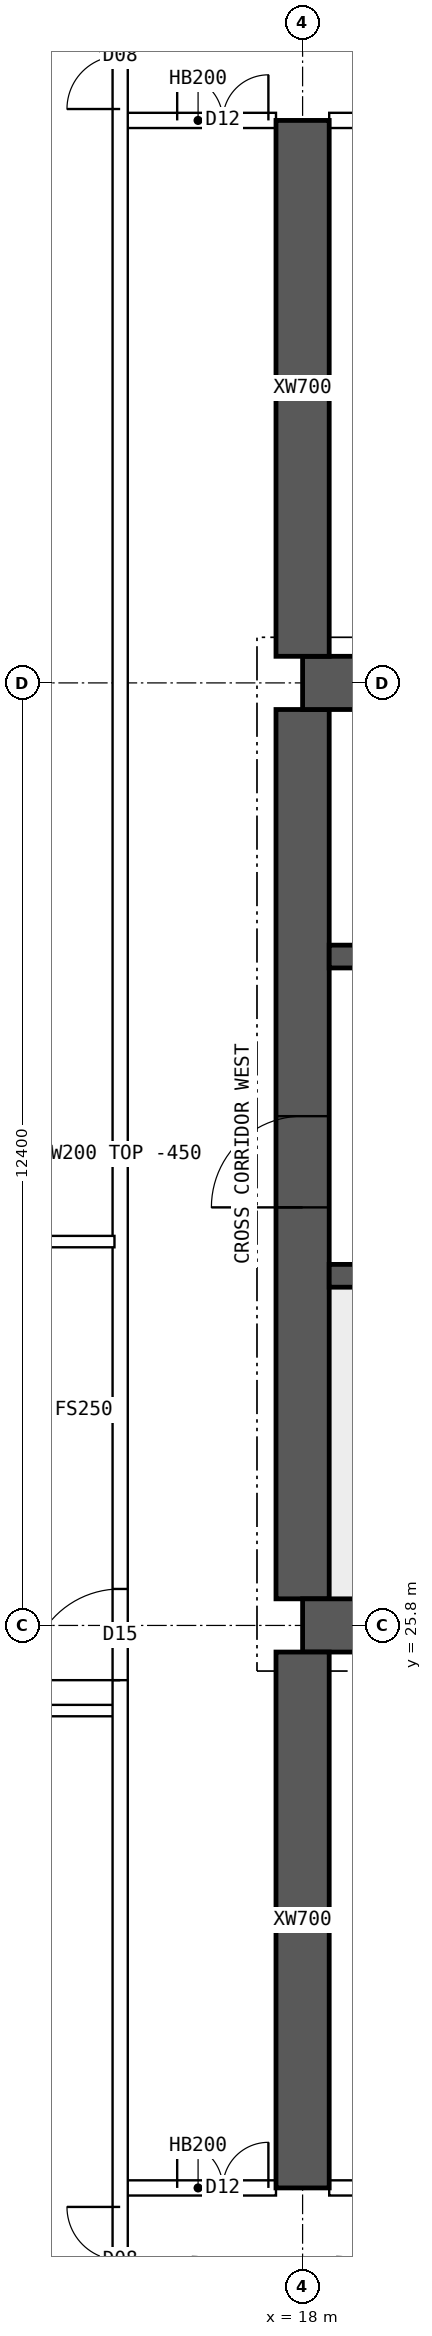
"""IFC4 building model, lengths in metres.
Left out: names, types, materials, properties, quantities, classifications, styles, units other than length and angle.
Written with IfcOpenShell. Run it as: python <this file> out.ifc"""

import sys

from ifc_helpers import new_model, si_unit, direction, frame, frame_2d, origin, place, context, subcontext, project, spatial, polyline, rectangle, outline, extrude, element, fill, save


model = new_model("IFC4")
c1 = context("Model", 3, precision=1e-05, world=origin(), true_north=direction((0.0, 1.0)))
c2 = subcontext(c1, "Body", "Model", "MODEL_VIEW")
j1 = project(units=[si_unit("LENGTHUNIT", "METRE"), si_unit("PLANEANGLEUNIT", "RADIAN")], contexts=[c1])
p1 = place(None, origin())
s1 = spatial("IfcSite", under=j1, at=p1, CompositionType="ELEMENT")
p2 = place(p1, origin())
s2 = spatial("IfcBuilding", under=s1, at=p2, CompositionType="ELEMENT")
p3 = place(p2, frame((0.0, 0.0, 212.8)))
s3 = spatial("IfcBuildingStorey", under=s2, at=p3, CompositionType="ELEMENT", Elevation=212.8)
for number, where, z_axis, x_axis in (
    (1, (18.0, 25.8, 0.0), (0.0, 0.0, 1.0), (1.0, 0.0, 0.0)),
    (2, (18.0, 38.2, 0.0), (0.0, 0.0, 1.0), (1.0, 0.0, 0.0)),
):
    element("IfcWall", number, at=place(p3, frame(where, z_axis=z_axis, x_axis=x_axis)), inside=s3, PredefinedType="SHEAR", context=c2, shape_type="SweptSolid", body=[
        extrude(rectangle(XDim=48.0, YDim=0.7, at=frame_2d((24.0, 0.0))), origin(), (0.0, 0.0, 1.0), 3.75),
    ])
p4 = place(p3, frame((18.0, 26.15, 0.0), z_axis=(0.0, 0.0, 1.0), x_axis=(0.0, 1.0, 0.0)))
e3 = element("IfcWall", 3, at=p4, inside=s3, PredefinedType="SHEAR", context=c2, shape_type="SweptSolid", body=[
    extrude(rectangle(XDim=11.7, YDim=0.7, at=frame_2d((5.85, 0.0))), origin(), (0.0, 0.0, 1.0), 3.75),
])
p5 = place(p4, frame((5.15, 0.0, 0.0)))
e4 = element("IfcOpeningElement", 4, at=p5, cuts=e3, PredefinedType="OPENING", context=c2, shape_type="SweptSolid", body=[
    extrude(rectangle(XDim=1.2, YDim=2.1, at=frame_2d((0.6, 1.05))), frame((0.0, 0.36, 0.0), z_axis=(0.0, -1.0, 0.0), x_axis=(1.0, 0.0, 0.0)), (0.0, 0.0, 1.0), 0.72),
])
p6 = place(p3, frame((18.35, 30.4, 0.0), z_axis=(0.0, 0.0, 1.0), x_axis=(1.0, 0.0, 0.0)))
e5 = element("IfcWall", 5, at=p6, inside=s3, PredefinedType="SHEAR", context=c2, shape_type="SweptSolid", body=[
    extrude(rectangle(XDim=47.3, YDim=0.3, at=frame_2d((23.65, 0.0))), origin(), (0.0, 0.0, 1.0), 3.75),
])
p7 = place(p6, frame((0.4, 0.0, 0.0)))
e6 = element("IfcOpeningElement", 6, at=p7, cuts=e5, PredefinedType="OPENING", context=c2, shape_type="SweptSolid", body=[
    extrude(rectangle(XDim=1.0, YDim=2.1, at=frame_2d((0.5, 1.05))), frame((0.0, 0.16, 0.0), z_axis=(0.0, -1.0, 0.0), x_axis=(1.0, 0.0, 0.0)), (0.0, 0.0, 1.0), 0.32),
])
p8 = place(p6, frame((45.9, 0.0, 0.0)))
e7 = element("IfcOpeningElement", 7, at=p8, cuts=e5, PredefinedType="OPENING", context=c2, shape_type="SweptSolid", body=[
    extrude(rectangle(XDim=1.0, YDim=2.1, at=frame_2d((0.5, 1.05))), frame((0.0, 0.16, 0.0), z_axis=(0.0, -1.0, 0.0), x_axis=(1.0, 0.0, 0.0)), (0.0, 0.0, 1.0), 0.32),
])
p9 = place(p6, frame((8.4, 0.0, 0.0)))
e8 = element("IfcOpeningElement", 8, at=p9, cuts=e5, PredefinedType="OPENING", context=c2, shape_type="SweptSolid", body=[
    extrude(rectangle(XDim=1.1, YDim=2.1, at=frame_2d((0.55, 1.05))), frame((0.0, 0.16, 0.0), z_axis=(0.0, -1.0, 0.0), x_axis=(1.0, 0.0, 0.0)), (0.0, 0.0, 1.0), 0.32),
])
p10 = place(p6, frame((11.0, 0.0, 0.0)))
e9 = element("IfcOpeningElement", 9, at=p10, cuts=e5, PredefinedType="OPENING", context=c2, shape_type="SweptSolid", body=[
    extrude(rectangle(XDim=1.1, YDim=2.1, at=frame_2d((0.55, 1.05))), frame((0.0, 0.16, 0.0), z_axis=(0.0, -1.0, 0.0), x_axis=(1.0, 0.0, 0.0)), (0.0, 0.0, 1.0), 0.32),
])
p11 = place(p6, frame((13.6, 0.0, 0.0)))
e10 = element("IfcOpeningElement", 10, at=p11, cuts=e5, PredefinedType="OPENING", context=c2, shape_type="SweptSolid", body=[
    extrude(rectangle(XDim=1.1, YDim=2.1, at=frame_2d((0.55, 1.05))), frame((0.0, 0.16, 0.0), z_axis=(0.0, -1.0, 0.0), x_axis=(1.0, 0.0, 0.0)), (0.0, 0.0, 1.0), 0.32),
])
p12 = place(p6, frame((16.2, 0.0, 0.0)))
e11 = element("IfcOpeningElement", 11, at=p12, cuts=e5, PredefinedType="OPENING", context=c2, shape_type="SweptSolid", body=[
    extrude(rectangle(XDim=1.1, YDim=2.1, at=frame_2d((0.55, 1.05))), frame((0.0, 0.16, 0.0), z_axis=(0.0, -1.0, 0.0), x_axis=(1.0, 0.0, 0.0)), (0.0, 0.0, 1.0), 0.32),
])
p13 = place(p6, frame((18.975, 0.0, 0.0)))
e12 = element("IfcOpeningElement", 12, at=p13, cuts=e5, PredefinedType="OPENING", context=c2, shape_type="SweptSolid", body=[
    extrude(rectangle(XDim=0.9, YDim=2.1, at=frame_2d((0.45, 1.05))), frame((0.0, 0.16, 0.0), z_axis=(0.0, -1.0, 0.0), x_axis=(1.0, 0.0, 0.0)), (0.0, 0.0, 1.0), 0.32),
])
p14 = place(p6, frame((30.267, 0.0, 0.0)))
e13 = element("IfcOpeningElement", 13, at=p14, cuts=e5, PredefinedType="OPENING", context=c2, shape_type="SweptSolid", body=[
    extrude(rectangle(XDim=1.1, YDim=2.1, at=frame_2d((0.55, 1.05))), frame((0.0, 0.16, 0.0), z_axis=(0.0, -1.0, 0.0), x_axis=(1.0, 0.0, 0.0)), (0.0, 0.0, 1.0), 0.32),
])
p15 = place(p6, frame((33.8, 0.0, 0.0)))
e14 = element("IfcOpeningElement", 14, at=p15, cuts=e5, PredefinedType="OPENING", context=c2, shape_type="SweptSolid", body=[
    extrude(rectangle(XDim=1.1, YDim=2.1, at=frame_2d((0.55, 1.05))), frame((0.0, 0.16, 0.0), z_axis=(0.0, -1.0, 0.0), x_axis=(1.0, 0.0, 0.0)), (0.0, 0.0, 1.0), 0.32),
])
p16 = place(p6, frame((37.333, 0.0, 0.0)))
e15 = element("IfcOpeningElement", 15, at=p16, cuts=e5, PredefinedType="OPENING", context=c2, shape_type="SweptSolid", body=[
    extrude(rectangle(XDim=1.1, YDim=2.1, at=frame_2d((0.55, 1.05))), frame((0.0, 0.16, 0.0), z_axis=(0.0, -1.0, 0.0), x_axis=(1.0, 0.0, 0.0)), (0.0, 0.0, 1.0), 0.32),
])
p17 = place(p3, frame((18.35, 34.6, 0.0), z_axis=(0.0, 0.0, 1.0), x_axis=(1.0, 0.0, 0.0)))
e16 = element("IfcWall", 16, at=p17, inside=s3, PredefinedType="SHEAR", context=c2, shape_type="SweptSolid", body=[
    extrude(rectangle(XDim=47.3, YDim=0.3, at=frame_2d((23.65, 0.0))), origin(), (0.0, 0.0, 1.0), 3.75),
])
p18 = place(p17, frame((0.9, 0.0, 0.0)))
e17 = element("IfcOpeningElement", 17, at=p18, cuts=e16, PredefinedType="OPENING", context=c2, shape_type="SweptSolid", body=[
    extrude(rectangle(XDim=1.1, YDim=2.1, at=frame_2d((0.55, 1.05))), frame((0.0, 0.16, 0.0), z_axis=(0.0, -1.0, 0.0), x_axis=(1.0, 0.0, 0.0)), (0.0, 0.0, 1.0), 0.32),
])
p19 = place(p17, frame((45.3, 0.0, 0.0)))
e18 = element("IfcOpeningElement", 18, at=p19, cuts=e16, PredefinedType="OPENING", context=c2, shape_type="SweptSolid", body=[
    extrude(rectangle(XDim=1.1, YDim=2.1, at=frame_2d((0.55, 1.05))), frame((0.0, 0.16, 0.0), z_axis=(0.0, -1.0, 0.0), x_axis=(1.0, 0.0, 0.0)), (0.0, 0.0, 1.0), 0.32),
])
p20 = place(p17, frame((4.25, 0.0, 0.0)))
e19 = element("IfcOpeningElement", 19, at=p20, cuts=e16, PredefinedType="OPENING", context=c2, shape_type="SweptSolid", body=[
    extrude(rectangle(XDim=0.9, YDim=2.1, at=frame_2d((0.45, 1.05))), frame((0.0, 0.16, 0.0), z_axis=(0.0, -1.0, 0.0), x_axis=(1.0, 0.0, 0.0)), (0.0, 0.0, 1.0), 0.32),
])
p21 = place(p17, frame((42.15, 0.0, 0.0)))
e20 = element("IfcOpeningElement", 20, at=p21, cuts=e16, PredefinedType="OPENING", context=c2, shape_type="SweptSolid", body=[
    extrude(rectangle(XDim=0.9, YDim=2.1, at=frame_2d((0.45, 1.05))), frame((0.0, 0.16, 0.0), z_axis=(0.0, -1.0, 0.0), x_axis=(1.0, 0.0, 0.0)), (0.0, 0.0, 1.0), 0.32),
])
p22 = place(p17, frame((9.025, 0.0, 0.0)))
e21 = element("IfcOpeningElement", 21, at=p22, cuts=e16, PredefinedType="OPENING", context=c2, shape_type="SweptSolid", body=[
    extrude(rectangle(XDim=0.9, YDim=2.1, at=frame_2d((0.45, 1.05))), frame((0.0, 0.16, 0.0), z_axis=(0.0, -1.0, 0.0), x_axis=(1.0, 0.0, 0.0)), (0.0, 0.0, 1.0), 0.32),
])
p23 = place(p17, frame((12.999, 0.0, 0.0)))
e22 = element("IfcOpeningElement", 22, at=p23, cuts=e16, PredefinedType="OPENING", context=c2, shape_type="SweptSolid", body=[
    extrude(rectangle(XDim=0.9, YDim=2.1, at=frame_2d((0.45, 1.05))), frame((0.0, 0.16, 0.0), z_axis=(0.0, -1.0, 0.0), x_axis=(1.0, 0.0, 0.0)), (0.0, 0.0, 1.0), 0.32),
])
p24 = place(p17, frame((16.646, 0.0, 0.0)))
e23 = element("IfcOpeningElement", 23, at=p24, cuts=e16, PredefinedType="OPENING", context=c2, shape_type="SweptSolid", body=[
    extrude(rectangle(XDim=0.9, YDim=2.1, at=frame_2d((0.45, 1.05))), frame((0.0, 0.16, 0.0), z_axis=(0.0, -1.0, 0.0), x_axis=(1.0, 0.0, 0.0)), (0.0, 0.0, 1.0), 0.32),
])
p25 = place(p17, frame((20.405, 0.0, 0.0)))
e24 = element("IfcOpeningElement", 24, at=p25, cuts=e16, PredefinedType="OPENING", context=c2, shape_type="SweptSolid", body=[
    extrude(rectangle(XDim=0.9, YDim=2.1, at=frame_2d((0.45, 1.05))), frame((0.0, 0.16, 0.0), z_axis=(0.0, -1.0, 0.0), x_axis=(1.0, 0.0, 0.0)), (0.0, 0.0, 1.0), 0.32),
])
p26 = place(p17, frame((24.811, 0.0, 0.0)))
e25 = element("IfcOpeningElement", 25, at=p26, cuts=e16, PredefinedType="OPENING", context=c2, shape_type="SweptSolid", body=[
    extrude(rectangle(XDim=0.9, YDim=2.1, at=frame_2d((0.45, 1.05))), frame((0.0, 0.16, 0.0), z_axis=(0.0, -1.0, 0.0), x_axis=(1.0, 0.0, 0.0)), (0.0, 0.0, 1.0), 0.32),
])
p27 = place(p17, frame((27.608, 0.0, 0.0)))
e26 = element("IfcOpeningElement", 26, at=p27, cuts=e16, PredefinedType="OPENING", context=c2, shape_type="SweptSolid", body=[
    extrude(rectangle(XDim=0.9, YDim=2.1, at=frame_2d((0.45, 1.05))), frame((0.0, 0.16, 0.0), z_axis=(0.0, -1.0, 0.0), x_axis=(1.0, 0.0, 0.0)), (0.0, 0.0, 1.0), 0.32),
])
p28 = place(p17, frame((29.981, 0.0, 0.0)))
e27 = element("IfcOpeningElement", 27, at=p28, cuts=e16, PredefinedType="OPENING", context=c2, shape_type="SweptSolid", body=[
    extrude(rectangle(XDim=0.9, YDim=2.1, at=frame_2d((0.45, 1.05))), frame((0.0, 0.16, 0.0), z_axis=(0.0, -1.0, 0.0), x_axis=(1.0, 0.0, 0.0)), (0.0, 0.0, 1.0), 0.32),
])
p29 = place(p17, frame((33.831, 0.0, 0.0)))
e28 = element("IfcOpeningElement", 28, at=p29, cuts=e16, PredefinedType="OPENING", context=c2, shape_type="SweptSolid", body=[
    extrude(rectangle(XDim=0.9, YDim=2.1, at=frame_2d((0.45, 1.05))), frame((0.0, 0.16, 0.0), z_axis=(0.0, -1.0, 0.0), x_axis=(1.0, 0.0, 0.0)), (0.0, 0.0, 1.0), 0.32),
])
p30 = place(p17, frame((37.579, 0.0, 0.0)))
e29 = element("IfcOpeningElement", 29, at=p30, cuts=e16, PredefinedType="OPENING", context=c2, shape_type="SweptSolid", body=[
    extrude(rectangle(XDim=0.9, YDim=2.1, at=frame_2d((0.45, 1.05))), frame((0.0, 0.16, 0.0), z_axis=(0.0, -1.0, 0.0), x_axis=(1.0, 0.0, 0.0)), (0.0, 0.0, 1.0), 0.32),
])
for number, where, z_axis, x_axis in (
    (30, (18.0, 18.4, 0.0), (0.0, 0.0, 1.0), (0.0, 1.0, 0.0)),
    (31, (18.0, 38.55, 0.0), (0.0, 0.0, 1.0), (0.0, 1.0, 0.0)),
):
    element("IfcWall", number, at=place(p3, frame(where, z_axis=z_axis, x_axis=x_axis)), inside=s3, PredefinedType="SHEAR", context=c2, shape_type="SweptSolid", body=[
        extrude(rectangle(XDim=7.05, YDim=0.7, at=frame_2d((3.525, 0.0))), origin(), (0.0, 0.0, 1.0), 3.75),
    ])
p31 = place(p3, frame((15.6, 18.4, 0.0), z_axis=(0.0, 0.0, 1.0), x_axis=(1.0, 0.0, 0.0)))
e32 = element("IfcWall", 32, at=p31, inside=s3, PredefinedType="SOLIDWALL", context=c2, shape_type="SweptSolid", body=[
    extrude(rectangle(XDim=2.05, YDim=0.2, at=frame_2d((1.025, 0.0))), origin(), (0.0, 0.0, 1.0), 3.3),
])
p32 = place(p31, frame((0.75, 0.0, 0.0)))
e33 = element("IfcOpeningElement", 33, at=p32, cuts=e32, PredefinedType="OPENING", context=c2, shape_type="SweptSolid", body=[
    extrude(rectangle(XDim=1.2, YDim=2.1, at=frame_2d((0.6, 1.05))), frame((0.0, 0.11, 0.0), z_axis=(0.0, -1.0, 0.0), x_axis=(1.0, 0.0, 0.0)), (0.0, 0.0, 1.0), 0.22),
])
p33 = place(p3, frame((18.35, 18.4, 0.0), z_axis=(0.0, 0.0, 1.0), x_axis=(1.0, 0.0, 0.0)))
e34 = element("IfcWall", 34, at=p33, inside=s3, PredefinedType="SOLIDWALL", context=c2, shape_type="SweptSolid", body=[
    extrude(rectangle(XDim=5.3, YDim=0.2, at=frame_2d((2.65, 0.0))), origin(), (0.0, 0.0, 1.0), 3.3),
])
p34 = place(p33, frame((0.35, 0.0, 0.0)))
e35 = element("IfcOpeningElement", 35, at=p34, cuts=e34, PredefinedType="OPENING", context=c2, shape_type="SweptSolid", body=[
    extrude(rectangle(XDim=0.9, YDim=2.1, at=frame_2d((0.45, 1.05))), frame((0.0, 0.11, 0.0), z_axis=(0.0, -1.0, 0.0), x_axis=(1.0, 0.0, 0.0)), (0.0, 0.0, 1.0), 0.22),
])
p35 = place(p33, frame((3.165, 0.0, 0.0)))
e36 = element("IfcOpeningElement", 36, at=p35, cuts=e34, PredefinedType="OPENING", context=c2, shape_type="SweptSolid", body=[
    extrude(rectangle(XDim=0.9, YDim=2.1, at=frame_2d((0.45, 1.05))), frame((0.0, 0.11, 0.0), z_axis=(0.0, -1.0, 0.0), x_axis=(1.0, 0.0, 0.0)), (0.0, 0.0, 1.0), 0.22),
])
p36 = place(p3, frame((15.6, 45.6, 0.0), z_axis=(0.0, 0.0, 1.0), x_axis=(1.0, 0.0, 0.0)))
e37 = element("IfcWall", 37, at=p36, inside=s3, PredefinedType="SOLIDWALL", context=c2, shape_type="SweptSolid", body=[
    extrude(rectangle(XDim=2.05, YDim=0.2, at=frame_2d((1.025, 0.0))), origin(), (0.0, 0.0, 1.0), 3.3),
])
p37 = place(p36, frame((0.75, 0.0, 0.0)))
e38 = element("IfcOpeningElement", 38, at=p37, cuts=e37, PredefinedType="OPENING", context=c2, shape_type="SweptSolid", body=[
    extrude(rectangle(XDim=1.2, YDim=2.1, at=frame_2d((0.6, 1.05))), frame((0.0, 0.11, 0.0), z_axis=(0.0, -1.0, 0.0), x_axis=(1.0, 0.0, 0.0)), (0.0, 0.0, 1.0), 0.22),
])
p38 = place(p3, frame((18.35, 45.6, 0.0), z_axis=(0.0, 0.0, 1.0), x_axis=(1.0, 0.0, 0.0)))
e39 = element("IfcWall", 39, at=p38, inside=s3, PredefinedType="SOLIDWALL", context=c2, shape_type="SweptSolid", body=[
    extrude(rectangle(XDim=5.3, YDim=0.2, at=frame_2d((2.65, 0.0))), origin(), (0.0, 0.0, 1.0), 3.3),
])
p39 = place(p38, frame((0.8, 0.0, 0.0)))
e40 = element("IfcOpeningElement", 40, at=p39, cuts=e39, PredefinedType="OPENING", context=c2, shape_type="SweptSolid", body=[
    extrude(rectangle(XDim=1.0, YDim=2.1, at=frame_2d((0.5, 1.05))), frame((0.0, 0.11, 0.0), z_axis=(0.0, -1.0, 0.0), x_axis=(1.0, 0.0, 0.0)), (0.0, 0.0, 1.0), 0.22),
])
p40 = place(p3, frame((8.705, 30.85, 0.0), z_axis=(0.0, 0.0, 1.0), x_axis=(1.0, 0.0, 0.0)))
e41 = element("IfcWall", 41, at=p40, inside=s3, PredefinedType="PARTITIONING", context=c2, shape_type="SweptSolid", body=[
    extrude(outline(polyline([(0.0, 0.0), (6.82, 0.0), (6.82, 3.3), (3.597, 3.3), (3.595, 2.85), (2.997, 2.85), (2.995, 3.3), (0.0, 3.3), (0.0, 0.0)])), frame((0.0, 0.075, 0.0), z_axis=(0.0, -1.0, 0.0), x_axis=(1.0, 0.0, 0.0)), (0.0, 0.0, 1.0), 0.15),
])
p41 = place(p3, frame((15.6, 11.646, 0.0), z_axis=(0.0, 0.0, 1.0), x_axis=(0.0, 1.0, 0.0)))
e42 = element("IfcWall", 42, at=p41, inside=s3, PredefinedType="SOLIDWALL", context=c2, shape_type="SweptSolid", body=[
    extrude(rectangle(XDim=40.708, YDim=0.2, at=frame_2d((20.354, 0.0))), origin(), (0.0, 0.0, 1.0), 3.3),
])
p42 = place(p41, frame((13.434, 0.0, 0.0)))
e43 = element("IfcOpeningElement", 43, at=p42, cuts=e42, PredefinedType="OPENING", context=c2, shape_type="SweptSolid", body=[
    extrude(rectangle(XDim=1.2, YDim=2.1, at=frame_2d((0.6, 1.05))), frame((0.0, 0.11, 0.0), z_axis=(0.0, -1.0, 0.0), x_axis=(1.0, 0.0, 0.0)), (0.0, 0.0, 1.0), 0.22),
])
p43 = place(p41, frame((5.104, 0.0, 0.0)))
e44 = element("IfcOpeningElement", 44, at=p43, cuts=e42, PredefinedType="OPENING", context=c2, shape_type="SweptSolid", body=[
    extrude(rectangle(XDim=1.4, YDim=2.1, at=frame_2d((0.7, 1.05))), frame((0.0, 0.11, 0.0), z_axis=(0.0, -1.0, 0.0), x_axis=(1.0, 0.0, 0.0)), (0.0, 0.0, 1.0), 0.22),
])
p44 = place(p41, frame((34.104, 0.0, 0.0)))
e45 = element("IfcOpeningElement", 45, at=p44, cuts=e42, PredefinedType="OPENING", context=c2, shape_type="SweptSolid", body=[
    extrude(rectangle(XDim=1.4, YDim=2.1, at=frame_2d((0.7, 1.05))), frame((0.0, 0.11, 0.0), z_axis=(0.0, -1.0, 0.0), x_axis=(1.0, 0.0, 0.0)), (0.0, 0.0, 1.0), 0.22),
])
p45 = place(p3, frame((8.705, 24.68, 0.0), z_axis=(0.0, 0.0, 1.0), x_axis=(1.0, 0.0, 0.0)))
e46 = element("IfcWall", 46, at=p45, inside=s3, PredefinedType="PARTITIONING", context=c2, shape_type="SweptSolid", body=[
    extrude(rectangle(XDim=6.82, YDim=0.15, at=frame_2d((3.41, 0.0))), origin(), (0.0, 0.0, 1.0), 3.3),
])
p46 = place(p5, origin())
e47 = element("IfcDoor", 47, at=p46, inside=s3, OperationType="SINGLE_SWING_LEFT", PredefinedType="DOOR", context=c2, shape_type="SweptSolid", body=[
    extrude(rectangle(XDim=1.2, YDim=2.1, at=frame_2d((0.6, 1.05))), frame((0.0, 0.025, 0.0), z_axis=(0.0, -1.0, 0.0), x_axis=(1.0, 0.0, 0.0)), (0.0, 0.0, 1.0), 0.05),
])
fill(e4, e47)
p47 = place(p32, origin())
e48 = element("IfcDoor", 48, at=p47, inside=s3, OperationType="DOUBLE_DOOR_SINGLE_SWING", PredefinedType="DOOR", context=c2, shape_type="SweptSolid", body=[
    extrude(rectangle(XDim=1.2, YDim=2.1, at=frame_2d((0.6, 1.05))), frame((0.0, 0.025, 0.0), z_axis=(0.0, -1.0, 0.0), x_axis=(1.0, 0.0, 0.0)), (0.0, 0.0, 1.0), 0.05),
])
fill(e33, e48)
p48 = place(p37, origin())
e49 = element("IfcDoor", 49, at=p48, inside=s3, OperationType="DOUBLE_DOOR_SINGLE_SWING", PredefinedType="DOOR", context=c2, shape_type="SweptSolid", body=[
    extrude(rectangle(XDim=1.2, YDim=2.1, at=frame_2d((0.6, 1.05))), frame((0.0, 0.025, 0.0), z_axis=(0.0, -1.0, 0.0), x_axis=(1.0, 0.0, 0.0)), (0.0, 0.0, 1.0), 0.05),
])
fill(e38, e49)
p49 = place(p42, origin())
e50 = element("IfcDoor", 50, at=p49, inside=s3, OperationType="SINGLE_SWING_LEFT", PredefinedType="DOOR", context=c2, shape_type="SweptSolid", body=[
    extrude(rectangle(XDim=1.2, YDim=2.1, at=frame_2d((0.6, 1.05))), frame((0.0, 0.025, 0.0), z_axis=(0.0, -1.0, 0.0), x_axis=(1.0, 0.0, 0.0)), (0.0, 0.0, 1.0), 0.05),
])
fill(e43, e50)
p50 = place(p43, origin())
e51 = element("IfcDoor", 51, at=p50, inside=s3, OperationType="DOUBLE_DOOR_SINGLE_SWING", PredefinedType="DOOR", context=c2, shape_type="SweptSolid", body=[
    extrude(rectangle(XDim=1.4, YDim=2.1, at=frame_2d((0.7, 1.05))), frame((0.0, 0.025, 0.0), z_axis=(0.0, -1.0, 0.0), x_axis=(1.0, 0.0, 0.0)), (0.0, 0.0, 1.0), 0.05),
])
fill(e44, e51)
p51 = place(p44, origin())
e52 = element("IfcDoor", 52, at=p51, inside=s3, OperationType="DOUBLE_DOOR_SINGLE_SWING", PredefinedType="DOOR", context=c2, shape_type="SweptSolid", body=[
    extrude(rectangle(XDim=1.4, YDim=2.1, at=frame_2d((0.7, 1.05))), frame((0.0, 0.025, 0.0), z_axis=(0.0, -1.0, 0.0), x_axis=(1.0, 0.0, 0.0)), (0.0, 0.0, 1.0), 0.05),
])
fill(e45, e52)
save(model, sys.argv[1])
